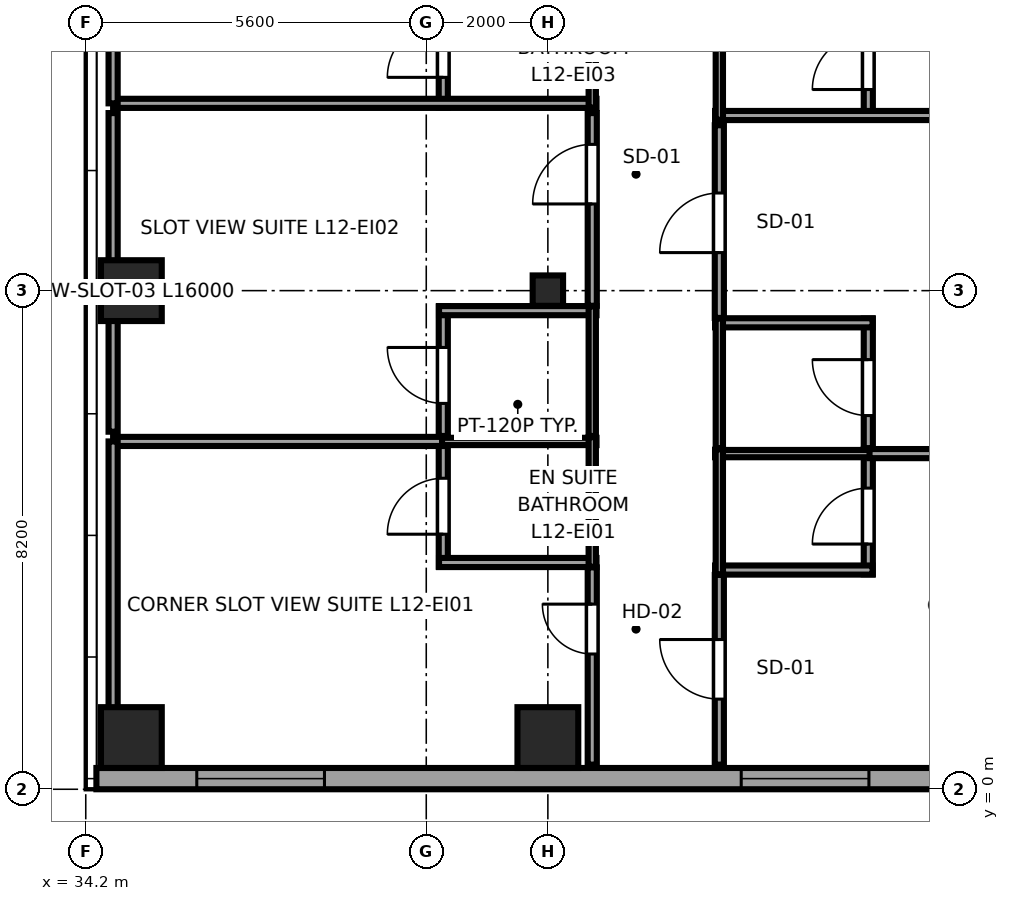
"""IFC4 building model, lengths in metres.
Left out: names, types, materials, properties, quantities, classifications, styles, units other than length and angle.
Written with IfcOpenShell. Run it as: python <this file> out.ifc"""

import sys

from ifc_helpers import new_model, si_unit, direction, frame, frame_2d, origin, origin_2d, place, context, subcontext, project, spatial, rectangle, i_section, extrude, source, transform, mapped, element, fill, save


model = new_model("IFC4")
c1 = context("Model", 3, precision=1e-05, world=origin(), true_north=direction((0.0, 1.0)))
c2 = subcontext(c1, "Body", "Model", "MODEL_VIEW")
j1 = project(units=[si_unit("LENGTHUNIT", "METRE"), si_unit("PLANEANGLEUNIT", "RADIAN")], contexts=[c1])
p1 = place(None, origin())
s1 = spatial("IfcSite", under=j1, at=p1, CompositionType="ELEMENT")
p2 = place(p1, origin())
s2 = spatial("IfcBuilding", under=s1, at=p2, CompositionType="ELEMENT")
p3 = place(p2, frame((0.0, 0.0, 53.3)))
s3 = spatial("IfcBuildingStorey", under=s2, at=p3, CompositionType="ELEMENT", Elevation=53.3)
m1 = source(origin(), c2, "Body", "SweptSolid", [
    extrude(rectangle(XDim=1.0, YDim=1.0, at=origin_2d()), origin(), (0.0, 0.0, 1.0), 3.55),
])
for number, where, z_axis, x_axis in (
    (1, (34.95, 0.85, 0.0), (0.0, 0.0, 1.0), (1.0, 0.0, 0.0)),
    (2, (34.95, 8.2, 0.0), (0.0, 0.0, 1.0), (1.0, 0.0, 0.0)),
    (3, (41.8, 0.85, 0.0), (0.0, 0.0, 1.0), (1.0, 0.0, 0.0)),
):
    element("IfcColumn", number, at=place(p3, frame(where, z_axis=z_axis, x_axis=x_axis)), inside=s3, PredefinedType="COLUMN", context=c2, shape_type="MappedRepresentation", body=[
        mapped(m1, transform((0.0, 0.0, 0.0), x_axis=(1.0, 0.0, 0.0), y_axis=(0.0, 1.0, 0.0), z_axis=(0.0, 0.0, 1.0), scale=1.0)),
    ])
m2 = source(origin(), c2, "Body", "SweptSolid", [
    extrude(i_section(OverallWidth=0.5, OverallDepth=0.5, WebThickness=0.028, FlangeThickness=0.045, at=origin_2d()), origin(), (0.0, 0.0, 1.0), 3.55),
])
p4 = place(p3, frame((41.8, 8.2, 0.0), z_axis=(0.0, 0.0, 1.0), x_axis=(1.0, 0.0, 0.0)))
e4 = element("IfcColumn", 4, at=p4, inside=s3, PredefinedType="COLUMN", context=c2, shape_type="MappedRepresentation", body=[
    mapped(m2, transform((0.0, 0.0, 0.0), x_axis=(1.0, 0.0, 0.0), y_axis=(0.0, 1.0, 0.0), z_axis=(0.0, 0.0, 1.0), scale=1.0)),
])
p5 = place(p3, frame((34.375, 0.175, 0.0), z_axis=(0.0, 0.0, 1.0), x_axis=(1.0, 0.0, 0.0)))
e5 = element("IfcWall", 5, at=p5, inside=s3, PredefinedType="SOLIDWALL", context=c2, shape_type="SweptSolid", body=[
    extrude(rectangle(XDim=18.008, YDim=0.35, at=frame_2d((9.004, 0.0))), origin(), (0.0, 0.0, 1.0), 3.37),
])
p6 = place(p5, frame((1.651, 0.0, 0.68)))
e6 = element("IfcOpeningElement", 6, at=p6, cuts=e5, PredefinedType="OPENING", context=c2, shape_type="SweptSolid", body=[
    extrude(rectangle(XDim=2.1, YDim=1.9, at=frame_2d((1.05, 0.95))), frame((0.0, 0.185, 0.0), z_axis=(0.0, -1.0, 0.0), x_axis=(1.0, 0.0, 0.0)), (0.0, 0.0, 1.0), 0.37),
])
p7 = place(p5, frame((10.605, 0.0, 0.68)))
e7 = element("IfcOpeningElement", 7, at=p7, cuts=e5, PredefinedType="OPENING", context=c2, shape_type="SweptSolid", body=[
    extrude(rectangle(XDim=2.1, YDim=1.9, at=frame_2d((1.05, 0.95))), frame((0.0, 0.185, 0.0), z_axis=(0.0, -1.0, 0.0), x_axis=(1.0, 0.0, 0.0)), (0.0, 0.0, 1.0), 0.37),
])
p8 = place(p3, frame((40.08, 3.659, 0.0), z_axis=(0.0, 0.0, 1.0), x_axis=(0.0, 1.0, 0.0)))
e8 = element("IfcWall", 8, at=p8, inside=s3, PredefinedType="PARTITIONING", context=c2, shape_type="SweptSolid", body=[
    extrude(rectangle(XDim=2.131, YDim=0.15, at=frame_2d((1.065, 0.0))), origin(), (0.0, 0.0, 1.0), 3.37),
])
p9 = place(p8, frame((0.535, 0.0, 0.0)))
e9 = element("IfcOpeningElement", 9, at=p9, cuts=e8, PredefinedType="OPENING", context=c2, shape_type="SweptSolid", body=[
    extrude(rectangle(XDim=0.92, YDim=2.01, at=frame_2d((0.46, 1.005))), frame((0.0, 0.085, 0.0), z_axis=(0.0, -1.0, 0.0), x_axis=(1.0, 0.0, 0.0)), (0.0, 0.0, 1.0), 0.17),
])
p10 = place(p3, frame((40.01, 3.729, 0.0), z_axis=(0.0, 0.0, 1.0), x_axis=(1.0, 0.0, 0.0)))
e10 = element("IfcWall", 10, at=p10, inside=s3, PredefinedType="PARTITIONING", context=c2, shape_type="SweptSolid", body=[
    extrude(rectangle(XDim=2.59, YDim=0.15, at=frame_2d((1.295, 0.0))), origin(), (0.0, 0.0, 1.0), 3.37),
])
p11 = place(p3, frame((40.01, 5.72, 0.0), z_axis=(0.0, 0.0, 1.0), x_axis=(1.0, 0.0, 0.0)))
e11 = element("IfcWall", 11, at=p11, inside=s3, PredefinedType="PLUMBINGWALL", context=c2, shape_type="SweptSolid", body=[
    extrude(rectangle(XDim=2.59, YDim=0.12, at=frame_2d((1.295, 0.0))), origin(), (0.0, 0.0, 1.0), 3.37),
])
p12 = place(p3, frame((42.53, 3.659, 0.0), z_axis=(0.0, 0.0, 1.0), x_axis=(0.0, 1.0, 0.0)))
e12 = element("IfcWall", 12, at=p12, inside=s3, PredefinedType="PLUMBINGWALL", context=c2, shape_type="SweptSolid", body=[
    extrude(rectangle(XDim=2.131, YDim=0.12, at=frame_2d((1.065, 0.0))), origin(), (0.0, 0.0, 1.0), 3.37),
])
p13 = place(p3, frame((40.08, 5.81, 0.0), z_axis=(0.0, 0.0, 1.0), x_axis=(0.0, 1.0, 0.0)))
e13 = element("IfcWall", 13, at=p13, inside=s3, PredefinedType="PARTITIONING", context=c2, shape_type="SweptSolid", body=[
    extrude(rectangle(XDim=2.131, YDim=0.15, at=frame_2d((1.065, 0.0))), origin(), (0.0, 0.0, 1.0), 3.37),
])
p14 = place(p13, frame((0.535, 0.0, 0.0)))
e14 = element("IfcOpeningElement", 14, at=p14, cuts=e13, PredefinedType="OPENING", context=c2, shape_type="SweptSolid", body=[
    extrude(rectangle(XDim=0.92, YDim=2.01, at=frame_2d((0.46, 1.005))), frame((0.0, 0.085, 0.0), z_axis=(0.0, -1.0, 0.0), x_axis=(1.0, 0.0, 0.0)), (0.0, 0.0, 1.0), 0.17),
])
p15 = place(p3, frame((40.01, 7.871, 0.0), z_axis=(0.0, 0.0, 1.0), x_axis=(1.0, 0.0, 0.0)))
e15 = element("IfcWall", 15, at=p15, inside=s3, PredefinedType="PARTITIONING", context=c2, shape_type="SweptSolid", body=[
    extrude(rectangle(XDim=2.59, YDim=0.15, at=frame_2d((1.295, 0.0))), origin(), (0.0, 0.0, 1.0), 3.37),
])
p16 = place(p3, frame((42.53, 5.81, 0.0), z_axis=(0.0, 0.0, 1.0), x_axis=(0.0, 1.0, 0.0)))
e16 = element("IfcWall", 16, at=p16, inside=s3, PredefinedType="PLUMBINGWALL", context=c2, shape_type="SweptSolid", body=[
    extrude(rectangle(XDim=2.131, YDim=0.12, at=frame_2d((1.065, 0.0))), origin(), (0.0, 0.0, 1.0), 3.37),
])
p17 = place(p3, frame((40.08, 11.21, 0.0), z_axis=(0.0, 0.0, 1.0), x_axis=(0.0, 1.0, 0.0)))
e17 = element("IfcWall", 17, at=p17, inside=s3, PredefinedType="PARTITIONING", context=c2, shape_type="SweptSolid", body=[
    extrude(rectangle(XDim=2.055, YDim=0.15, at=frame_2d((1.027, 0.0))), origin(), (0.0, 0.0, 1.0), 3.37),
])
p18 = place(p17, frame((0.498, 0.0, 0.0)))
e18 = element("IfcOpeningElement", 18, at=p18, cuts=e17, PredefinedType="OPENING", context=c2, shape_type="SweptSolid", body=[
    extrude(rectangle(XDim=0.92, YDim=2.01, at=frame_2d((0.46, 1.005))), frame((0.0, 0.085, 0.0), z_axis=(0.0, -1.0, 0.0), x_axis=(1.0, 0.0, 0.0)), (0.0, 0.0, 1.0), 0.17),
])
p19 = place(p3, frame((34.65, 11.28, 0.0), z_axis=(0.0, 0.0, 1.0), x_axis=(1.0, 0.0, 0.0)))
e19 = element("IfcWall", 19, at=p19, inside=s3, PredefinedType="PARTITIONING", context=c2, shape_type="SweptSolid", body=[
    extrude(rectangle(XDim=7.95, YDim=0.15, at=frame_2d((3.975, 0.0))), origin(), (0.0, 0.0, 1.0), 3.37),
])
p20 = place(p3, frame((42.53, 11.21, 0.0), z_axis=(0.0, 0.0, 1.0), x_axis=(0.0, 1.0, 0.0)))
e20 = element("IfcWall", 20, at=p20, inside=s3, PredefinedType="PLUMBINGWALL", context=c2, shape_type="SweptSolid", body=[
    extrude(rectangle(XDim=2.055, YDim=0.12, at=frame_2d((1.027, 0.0))), origin(), (0.0, 0.0, 1.0), 3.37),
])
p21 = place(p3, frame((47.07, 3.535, 0.0), z_axis=(0.0, 0.0, 1.0), x_axis=(0.0, 1.0, 0.0)))
e21 = element("IfcWall", 21, at=p21, inside=s3, PredefinedType="PARTITIONING", context=c2, shape_type="SweptSolid", body=[
    extrude(rectangle(XDim=2.055, YDim=0.15, at=frame_2d((1.028, 0.0))), origin(), (0.0, 0.0, 1.0), 3.37),
])
p22 = place(p21, frame((0.498, 0.0, 0.0)))
e22 = element("IfcOpeningElement", 22, at=p22, cuts=e21, PredefinedType="OPENING", context=c2, shape_type="SweptSolid", body=[
    extrude(rectangle(XDim=0.92, YDim=2.01, at=frame_2d((0.46, 1.005))), frame((0.0, 0.085, 0.0), z_axis=(0.0, -1.0, 0.0), x_axis=(1.0, 0.0, 0.0)), (0.0, 0.0, 1.0), 0.17),
])
p23 = place(p3, frame((44.55, 3.605, 0.0), z_axis=(0.0, 0.0, 1.0), x_axis=(1.0, 0.0, 0.0)))
e23 = element("IfcWall", 23, at=p23, inside=s3, PredefinedType="PARTITIONING", context=c2, shape_type="SweptSolid", body=[
    extrude(rectangle(XDim=2.59, YDim=0.15, at=frame_2d((1.295, 0.0))), origin(), (0.0, 0.0, 1.0), 3.37),
])
p24 = place(p3, frame((44.55, 5.52, 0.0), z_axis=(0.0, 0.0, 1.0), x_axis=(1.0, 0.0, 0.0)))
e24 = element("IfcWall", 24, at=p24, inside=s3, PredefinedType="PLUMBINGWALL", context=c2, shape_type="SweptSolid", body=[
    extrude(rectangle(XDim=2.59, YDim=0.12, at=frame_2d((1.295, 0.0))), origin(), (0.0, 0.0, 1.0), 3.37),
])
p25 = place(p3, frame((44.62, 3.535, 0.0), z_axis=(0.0, 0.0, 1.0), x_axis=(0.0, 1.0, 0.0)))
e25 = element("IfcWall", 25, at=p25, inside=s3, PredefinedType="PLUMBINGWALL", context=c2, shape_type="SweptSolid", body=[
    extrude(rectangle(XDim=2.055, YDim=0.12, at=frame_2d((1.028, 0.0))), origin(), (0.0, 0.0, 1.0), 3.37),
])
p26 = place(p3, frame((47.07, 5.61, 0.0), z_axis=(0.0, 0.0, 1.0), x_axis=(0.0, 1.0, 0.0)))
e26 = element("IfcWall", 26, at=p26, inside=s3, PredefinedType="PARTITIONING", context=c2, shape_type="SweptSolid", body=[
    extrude(rectangle(XDim=2.131, YDim=0.15, at=frame_2d((1.065, 0.0))), origin(), (0.0, 0.0, 1.0), 3.37),
])
p27 = place(p26, frame((0.535, 0.0, 0.0)))
e27 = element("IfcOpeningElement", 27, at=p27, cuts=e26, PredefinedType="OPENING", context=c2, shape_type="SweptSolid", body=[
    extrude(rectangle(XDim=0.92, YDim=2.01, at=frame_2d((0.46, 1.005))), frame((0.0, 0.085, 0.0), z_axis=(0.0, -1.0, 0.0), x_axis=(1.0, 0.0, 0.0)), (0.0, 0.0, 1.0), 0.17),
])
p28 = place(p3, frame((44.55, 7.671, 0.0), z_axis=(0.0, 0.0, 1.0), x_axis=(1.0, 0.0, 0.0)))
e28 = element("IfcWall", 28, at=p28, inside=s3, PredefinedType="PARTITIONING", context=c2, shape_type="SweptSolid", body=[
    extrude(rectangle(XDim=2.59, YDim=0.15, at=frame_2d((1.295, 0.0))), origin(), (0.0, 0.0, 1.0), 3.37),
])
p29 = place(p3, frame((44.62, 5.61, 0.0), z_axis=(0.0, 0.0, 1.0), x_axis=(0.0, 1.0, 0.0)))
e29 = element("IfcWall", 29, at=p29, inside=s3, PredefinedType="PLUMBINGWALL", context=c2, shape_type="SweptSolid", body=[
    extrude(rectangle(XDim=2.131, YDim=0.12, at=frame_2d((1.065, 0.0))), origin(), (0.0, 0.0, 1.0), 3.37),
])
p30 = place(p3, frame((47.07, 11.01, 0.0), z_axis=(0.0, 0.0, 1.0), x_axis=(0.0, 1.0, 0.0)))
e30 = element("IfcWall", 30, at=p30, inside=s3, PredefinedType="PARTITIONING", context=c2, shape_type="SweptSolid", body=[
    extrude(rectangle(XDim=2.055, YDim=0.15, at=frame_2d((1.027, 0.0))), origin(), (0.0, 0.0, 1.0), 3.37),
])
p31 = place(p30, frame((0.498, 0.0, 0.0)))
e31 = element("IfcOpeningElement", 31, at=p31, cuts=e30, PredefinedType="OPENING", context=c2, shape_type="SweptSolid", body=[
    extrude(rectangle(XDim=0.92, YDim=2.01, at=frame_2d((0.46, 1.005))), frame((0.0, 0.085, 0.0), z_axis=(0.0, -1.0, 0.0), x_axis=(1.0, 0.0, 0.0)), (0.0, 0.0, 1.0), 0.17),
])
p32 = place(p3, frame((44.55, 11.08, 0.0), z_axis=(0.0, 0.0, 1.0), x_axis=(1.0, 0.0, 0.0)))
e32 = element("IfcWall", 32, at=p32, inside=s3, PredefinedType="PARTITIONING", context=c2, shape_type="SweptSolid", body=[
    extrude(rectangle(XDim=12.045, YDim=0.15, at=frame_2d((6.022, 0.0))), origin(), (0.0, 0.0, 1.0), 3.37),
])
p33 = place(p3, frame((44.62, 11.01, 0.0), z_axis=(0.0, 0.0, 1.0), x_axis=(0.0, 1.0, 0.0)))
e33 = element("IfcWall", 33, at=p33, inside=s3, PredefinedType="PLUMBINGWALL", context=c2, shape_type="SweptSolid", body=[
    extrude(rectangle(XDim=2.055, YDim=0.12, at=frame_2d((1.027, 0.0))), origin(), (0.0, 0.0, 1.0), 3.37),
])
p34 = place(p3, frame((42.53, 0.405, 0.0), z_axis=(0.0, 0.0, 1.0), x_axis=(0.0, 1.0, 0.0)))
e34 = element("IfcWall", 34, at=p34, inside=s3, PredefinedType="PARTITIONING", context=c2, shape_type="SweptSolid", body=[
    extrude(rectangle(XDim=3.244, YDim=0.15, at=frame_2d((1.622, 0.0))), origin(), (0.0, 0.0, 1.0), 3.37),
])
p35 = place(p34, frame((1.82, 0.0, 0.0)))
e35 = element("IfcOpeningElement", 35, at=p35, cuts=e34, PredefinedType="OPENING", context=c2, shape_type="SweptSolid", body=[
    extrude(rectangle(XDim=0.82, YDim=2.01, at=frame_2d((0.41, 1.005))), frame((0.0, 0.085, 0.0), z_axis=(0.0, -1.0, 0.0), x_axis=(1.0, 0.0, 0.0)), (0.0, 0.0, 1.0), 0.17),
])
p36 = place(p3, frame((34.65, 5.72, 0.0), z_axis=(0.0, 0.0, 1.0), x_axis=(1.0, 0.0, 0.0)))
e36 = element("IfcWall", 36, at=p36, inside=s3, PredefinedType="PARTITIONING", context=c2, shape_type="SweptSolid", body=[
    extrude(rectangle(XDim=5.41, YDim=0.15, at=frame_2d((2.705, 0.0))), origin(), (0.0, 0.0, 1.0), 3.37),
])
p37 = place(p3, frame((34.65, 0.405, 0.0), z_axis=(0.0, 0.0, 1.0), x_axis=(0.0, 1.0, 0.0)))
e37 = element("IfcWall", 37, at=p37, inside=s3, PredefinedType="PARTITIONING", context=c2, shape_type="SweptSolid", body=[
    extrude(rectangle(XDim=5.315, YDim=0.15, at=frame_2d((2.657, 0.0))), origin(), (0.0, 0.0, 1.0), 3.37),
])
p38 = place(p3, frame((42.53, 7.951, 0.0), z_axis=(0.0, 0.0, 1.0), x_axis=(0.0, 1.0, 0.0)))
e38 = element("IfcWall", 38, at=p38, inside=s3, PredefinedType="PARTITIONING", context=c2, shape_type="SweptSolid", body=[
    extrude(rectangle(XDim=3.169, YDim=0.15, at=frame_2d((1.584, 0.0))), origin(), (0.0, 0.0, 1.0), 3.37),
])
p39 = place(p38, frame((1.675, 0.0, 0.0)))
e39 = element("IfcOpeningElement", 39, at=p39, cuts=e38, PredefinedType="OPENING", context=c2, shape_type="SweptSolid", body=[
    extrude(rectangle(XDim=0.98, YDim=2.12, at=frame_2d((0.49, 1.06))), frame((0.0, 0.085, 0.0), z_axis=(0.0, -1.0, 0.0), x_axis=(1.0, 0.0, 0.0)), (0.0, 0.0, 1.0), 0.17),
])
p40 = place(p3, frame((34.65, 5.88, 0.0), z_axis=(0.0, 0.0, 1.0), x_axis=(0.0, 1.0, 0.0)))
e40 = element("IfcWall", 40, at=p40, inside=s3, PredefinedType="PARTITIONING", context=c2, shape_type="SweptSolid", body=[
    extrude(rectangle(XDim=5.24, YDim=0.15, at=frame_2d((2.62, 0.0))), origin(), (0.0, 0.0, 1.0), 3.37),
])
p41 = place(p3, frame((34.65, 11.28, 0.0), z_axis=(0.0, 0.0, 1.0), x_axis=(0.0, 1.0, 0.0)))
e41 = element("IfcWall", 41, at=p41, inside=s3, PredefinedType="PARTITIONING", context=c2, shape_type="SweptSolid", body=[
    extrude(rectangle(XDim=5.04, YDim=0.15, at=frame_2d((2.52, 0.0))), origin(), (0.0, 0.0, 1.0), 3.37),
])
p42 = place(p3, frame((44.62, 0.405, 0.0), z_axis=(0.0, 0.0, 1.0), x_axis=(0.0, 1.0, 0.0)))
e42 = element("IfcWall", 42, at=p42, inside=s3, PredefinedType="PARTITIONING", context=c2, shape_type="SweptSolid", body=[
    extrude(rectangle(XDim=3.12, YDim=0.15, at=frame_2d((1.56, 0.0))), origin(), (0.0, 0.0, 1.0), 3.37),
])
p43 = place(p42, frame((1.077, 0.0, 0.0)))
e43 = element("IfcOpeningElement", 43, at=p43, cuts=e42, PredefinedType="OPENING", context=c2, shape_type="SweptSolid", body=[
    extrude(rectangle(XDim=0.98, YDim=2.12, at=frame_2d((0.49, 1.06))), frame((0.0, 0.085, 0.0), z_axis=(0.0, -1.0, 0.0), x_axis=(1.0, 0.0, 0.0)), (0.0, 0.0, 1.0), 0.17),
])
p44 = place(p3, frame((47.09, 5.52, 0.0), z_axis=(0.0, 0.0, 1.0), x_axis=(1.0, 0.0, 0.0)))
e44 = element("IfcWall", 44, at=p44, inside=s3, PredefinedType="PARTITIONING", context=c2, shape_type="SweptSolid", body=[
    extrude(rectangle(XDim=9.505, YDim=0.15, at=frame_2d((4.752, 0.0))), origin(), (0.0, 0.0, 1.0), 3.37),
])
p45 = place(p3, frame((44.62, 7.751, 0.0), z_axis=(0.0, 0.0, 1.0), x_axis=(0.0, 1.0, 0.0)))
e45 = element("IfcWall", 45, at=p45, inside=s3, PredefinedType="PARTITIONING", context=c2, shape_type="SweptSolid", body=[
    extrude(rectangle(XDim=3.169, YDim=0.15, at=frame_2d((1.584, 0.0))), origin(), (0.0, 0.0, 1.0), 3.37),
])
p46 = place(p45, frame((1.074, 0.0, 0.0)))
e46 = element("IfcOpeningElement", 46, at=p46, cuts=e45, PredefinedType="OPENING", context=c2, shape_type="SweptSolid", body=[
    extrude(rectangle(XDim=0.98, YDim=2.12, at=frame_2d((0.49, 1.06))), frame((0.0, 0.085, 0.0), z_axis=(0.0, -1.0, 0.0), x_axis=(1.0, 0.0, 0.0)), (0.0, 0.0, 1.0), 0.17),
])
m3 = source(origin(), c2, "Body", "SweptSolid", [
    extrude(rectangle(XDim=2.1, YDim=1.9, at=frame_2d((1.05, 0.95))), frame((0.0, 0.09, 0.0), z_axis=(0.0, -1.0, 0.0), x_axis=(1.0, 0.0, 0.0)), (0.0, 0.0, 1.0), 0.06),
])
p47 = place(p6, origin())
e47 = element("IfcWindow", 47, at=p47, inside=s3, PartitioningType="TRIPLE_PANEL_HORIZONTAL", PredefinedType="WINDOW", context=c2, shape_type="MappedRepresentation", body=[
    mapped(m3, transform((0.0, 0.0, 0.0), x_axis=(1.0, 0.0, 0.0), y_axis=(0.0, 1.0, 0.0), z_axis=(0.0, 0.0, 1.0), scale=1.0)),
])
fill(e6, e47)
p48 = place(p7, origin())
e48 = element("IfcWindow", 48, at=p48, inside=s3, PartitioningType="TRIPLE_PANEL_HORIZONTAL", PredefinedType="WINDOW", context=c2, shape_type="MappedRepresentation", body=[
    mapped(m3, transform((0.0, 0.0, 0.0), x_axis=(1.0, 0.0, 0.0), y_axis=(0.0, 1.0, 0.0), z_axis=(0.0, 0.0, 1.0), scale=1.0)),
])
fill(e7, e48)
m4 = source(origin(), c2, "Body", "SweptSolid", [
    extrude(rectangle(XDim=0.92, YDim=2.01, at=frame_2d((0.46, 1.005))), frame((0.0, 0.025, 0.0), z_axis=(0.0, -1.0, 0.0), x_axis=(1.0, 0.0, 0.0)), (0.0, 0.0, 1.0), 0.05),
])
p49 = place(p9, origin())
e49 = element("IfcDoor", 49, at=p49, inside=s3, OperationType="SINGLE_SWING_LEFT", PredefinedType="DOOR", context=c2, shape_type="MappedRepresentation", body=[
    mapped(m4, transform((0.0, 0.0, 0.0), x_axis=(1.0, 0.0, 0.0), y_axis=(0.0, 1.0, 0.0), z_axis=(0.0, 0.0, 1.0), scale=1.0)),
])
fill(e9, e49)
p50 = place(p14, origin())
e50 = element("IfcDoor", 50, at=p50, inside=s3, OperationType="SINGLE_SWING_RIGHT", PredefinedType="DOOR", context=c2, shape_type="MappedRepresentation", body=[
    mapped(m4, transform((0.0, 0.0, 0.0), x_axis=(1.0, 0.0, 0.0), y_axis=(0.0, 1.0, 0.0), z_axis=(0.0, 0.0, 1.0), scale=1.0)),
])
fill(e14, e50)
p51 = place(p18, origin())
e51 = element("IfcDoor", 51, at=p51, inside=s3, OperationType="SINGLE_SWING_LEFT", PredefinedType="DOOR", context=c2, shape_type="MappedRepresentation", body=[
    mapped(m4, transform((0.0, 0.0, 0.0), x_axis=(1.0, 0.0, 0.0), y_axis=(0.0, 1.0, 0.0), z_axis=(0.0, 0.0, 1.0), scale=1.0)),
])
fill(e18, e51)
p52 = place(p22, origin())
e52 = element("IfcDoor", 52, at=p52, inside=s3, OperationType="SINGLE_SWING_LEFT", PredefinedType="DOOR", context=c2, shape_type="MappedRepresentation", body=[
    mapped(m4, transform((0.0, 0.0, 0.0), x_axis=(1.0, 0.0, 0.0), y_axis=(0.0, 1.0, 0.0), z_axis=(0.0, 0.0, 1.0), scale=1.0)),
])
fill(e22, e52)
p53 = place(p27, origin())
e53 = element("IfcDoor", 53, at=p53, inside=s3, OperationType="SINGLE_SWING_RIGHT", PredefinedType="DOOR", context=c2, shape_type="MappedRepresentation", body=[
    mapped(m4, transform((0.0, 0.0, 0.0), x_axis=(1.0, 0.0, 0.0), y_axis=(0.0, 1.0, 0.0), z_axis=(0.0, 0.0, 1.0), scale=1.0)),
])
fill(e27, e53)
p54 = place(p31, origin())
e54 = element("IfcDoor", 54, at=p54, inside=s3, OperationType="SINGLE_SWING_LEFT", PredefinedType="DOOR", context=c2, shape_type="MappedRepresentation", body=[
    mapped(m4, transform((0.0, 0.0, 0.0), x_axis=(1.0, 0.0, 0.0), y_axis=(0.0, 1.0, 0.0), z_axis=(0.0, 0.0, 1.0), scale=1.0)),
])
fill(e31, e54)
m5 = source(origin(), c2, "Body", "SweptSolid", [
    extrude(rectangle(XDim=0.82, YDim=2.01, at=frame_2d((0.41, 1.005))), frame((0.0, 0.025, 0.0), z_axis=(0.0, -1.0, 0.0), x_axis=(1.0, 0.0, 0.0)), (0.0, 0.0, 1.0), 0.05),
])
p55 = place(p35, origin())
e55 = element("IfcDoor", 55, at=p55, inside=s3, OperationType="SINGLE_SWING_RIGHT", PredefinedType="DOOR", context=c2, shape_type="MappedRepresentation", body=[
    mapped(m5, transform((0.0, 0.0, 0.0), x_axis=(1.0, 0.0, 0.0), y_axis=(0.0, 1.0, 0.0), z_axis=(0.0, 0.0, 1.0), scale=1.0)),
])
fill(e35, e55)
m6 = source(origin(), c2, "Body", "SweptSolid", [
    extrude(rectangle(XDim=0.98, YDim=2.12, at=frame_2d((0.49, 1.06))), frame((0.0, 0.025, 0.0), z_axis=(0.0, -1.0, 0.0), x_axis=(1.0, 0.0, 0.0)), (0.0, 0.0, 1.0), 0.05),
])
p56 = place(p39, origin())
e56 = element("IfcDoor", 56, at=p56, inside=s3, OperationType="SINGLE_SWING_LEFT", PredefinedType="DOOR", context=c2, shape_type="MappedRepresentation", body=[
    mapped(m6, transform((0.0, 0.0, 0.0), x_axis=(1.0, 0.0, 0.0), y_axis=(0.0, 1.0, 0.0), z_axis=(0.0, 0.0, 1.0), scale=1.0)),
])
fill(e39, e56)
p57 = place(p43, origin())
e57 = element("IfcDoor", 57, at=p57, inside=s3, OperationType="SINGLE_SWING_RIGHT", PredefinedType="DOOR", context=c2, shape_type="MappedRepresentation", body=[
    mapped(m6, transform((0.0, 0.0, 0.0), x_axis=(1.0, 0.0, 0.0), y_axis=(0.0, 1.0, 0.0), z_axis=(0.0, 0.0, 1.0), scale=1.0)),
])
fill(e43, e57)
p58 = place(p46, origin())
e58 = element("IfcDoor", 58, at=p58, inside=s3, OperationType="SINGLE_SWING_LEFT", PredefinedType="DOOR", context=c2, shape_type="MappedRepresentation", body=[
    mapped(m6, transform((0.0, 0.0, 0.0), x_axis=(1.0, 0.0, 0.0), y_axis=(0.0, 1.0, 0.0), z_axis=(0.0, 0.0, 1.0), scale=1.0)),
])
fill(e46, e58)
save(model, sys.argv[1])
